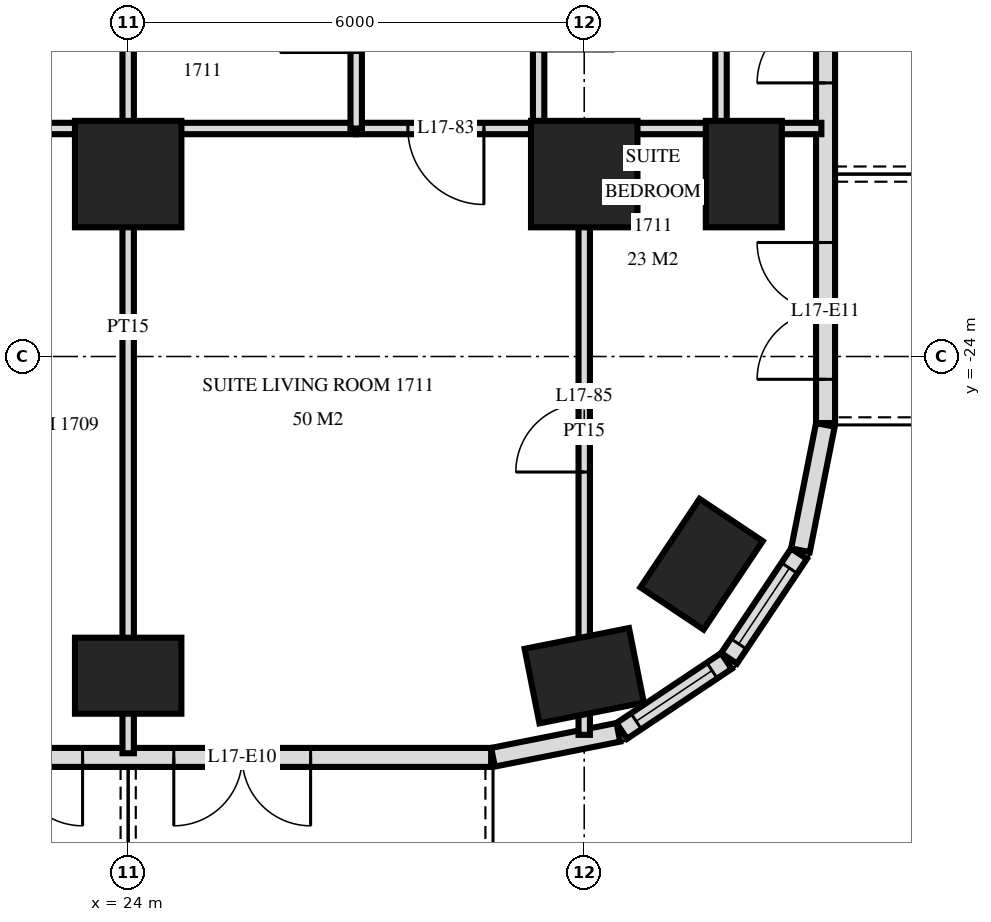
"""IFC4 building model, lengths in metres.
Left out: names, types, materials, properties, quantities, classifications, styles, units other than length and angle.
Written with IfcOpenShell. Run it as: python <this file> out.ifc"""

import sys

from ifc_helpers import new_model, si_unit, direction, frame, frame_2d, origin, origin_2d, place, context, subcontext, project, spatial, rectangle, extrude, element, fill, save


model = new_model("IFC4")
c1 = context("Model", 3, precision=1e-05, world=origin(), true_north=direction((0.0, 1.0)))
c2 = subcontext(c1, "Body", "Model", "MODEL_VIEW")
j1 = project(units=[si_unit("LENGTHUNIT", "METRE"), si_unit("PLANEANGLEUNIT", "RADIAN")], contexts=[c1])
p1 = place(None, origin())
s1 = spatial("IfcSite", under=j1, at=p1, CompositionType="ELEMENT")
p2 = place(p1, origin())
s2 = spatial("IfcBuilding", under=s1, at=p2, CompositionType="ELEMENT")
p3 = place(p2, frame((0.0, 0.0, 70.8)))
s3 = spatial("IfcBuildingStorey", under=s2, at=p3, CompositionType="ELEMENT", Elevation=70.8)
p4 = place(p3, frame((24.0, -28.2, 0.0), z_axis=(0.0, 0.0, 1.0), x_axis=(1.0, 0.0, 0.0)))
e1 = element("IfcColumn", 1, at=p4, inside=s3, PredefinedType="COLUMN", context=c2, shape_type="SweptSolid", body=[
    extrude(rectangle(XDim=1.4, YDim=1.0, at=origin_2d()), origin(), (0.0, 0.0, 1.0), 3.6),
])
p5 = place(p3, frame((24.0, -21.6, 0.0), z_axis=(0.0, 0.0, 1.0), x_axis=(1.0, 0.0, 0.0)))
e2 = element("IfcColumn", 2, at=p5, inside=s3, PredefinedType="COLUMN", context=c2, shape_type="SweptSolid", body=[
    extrude(rectangle(XDim=1.4, YDim=1.4, at=origin_2d()), origin(), (0.0, 0.0, 1.0), 3.6),
])
p6 = place(p3, frame((30.0, -28.2, 0.0), z_axis=(0.0, 0.0, 1.0), x_axis=(0.980792089743, 0.195056086032, 0.0)))
e3 = element("IfcColumn", 3, at=p6, inside=s3, PredefinedType="COLUMN", context=c2, shape_type="SweptSolid", body=[
    extrude(rectangle(XDim=1.4, YDim=1.0, at=origin_2d()), origin(), (0.0, 0.0, 1.0), 3.6),
])
p7 = place(p3, frame((30.0, -21.6, 0.0), z_axis=(0.0, 0.0, 1.0), x_axis=(1.0, 0.0, 0.0)))
e4 = element("IfcColumn", 4, at=p7, inside=s3, PredefinedType="COLUMN", context=c2, shape_type="SweptSolid", body=[
    extrude(rectangle(XDim=1.4, YDim=1.4, at=origin_2d()), origin(), (0.0, 0.0, 1.0), 3.6),
])
for number, where, z_axis, x_axis in (
    (5, (31.544, -26.733, 0.0), (0.0, 0.0, 1.0), (0.556, 0.831, 0.0)),
    (6, (32.1, -21.6, 0.0), (0.0, 0.0, 1.0), (0.0, 1.0, 0.0)),
):
    element("IfcColumn", number, at=place(p3, frame(where, z_axis=z_axis, x_axis=x_axis)), inside=s3, PredefinedType="COLUMN", context=c2, shape_type="SweptSolid", body=[
        extrude(rectangle(XDim=1.4, YDim=1.0, at=origin_2d()), origin(), (0.0, 0.0, 1.0), 3.6),
    ])
p8 = place(p3, frame((-28.775, -29.275, 0.0), z_axis=(0.0, 0.0, 1.0), x_axis=(1.0, 0.0, 0.0)))
e7 = element("IfcWall", 7, at=p8, inside=s3, PredefinedType="SOLIDWALL", context=c2, shape_type="SweptSolid", body=[
    extrude(rectangle(XDim=57.551, YDim=0.25, at=frame_2d((28.775, 0.0))), origin(), (0.0, 0.0, 1.0), 3.32),
])
p9 = place(p8, frame((0.575, 0.0, 0.0)))
e8 = element("IfcOpeningElement", 8, at=p9, cuts=e7, PredefinedType="OPENING", context=c2, shape_type="SweptSolid", body=[
    extrude(rectangle(XDim=1.8, YDim=2.4, at=frame_2d((0.9, 1.2))), frame((0.0, 0.135, 0.0), z_axis=(0.0, -1.0, 0.0), x_axis=(1.0, 0.0, 0.0)), (0.0, 0.0, 1.0), 0.27),
])
p10 = place(p8, frame((5.075, 0.0, 0.3)))
e9 = element("IfcOpeningElement", 9, at=p10, cuts=e7, PredefinedType="OPENING", context=c2, shape_type="SweptSolid", body=[
    extrude(rectangle(XDim=2.4, YDim=2.1, at=frame_2d((1.2, 1.05))), frame((0.0, 0.135, 0.0), z_axis=(0.0, -1.0, 0.0), x_axis=(1.0, 0.0, 0.0)), (0.0, 0.0, 1.0), 0.27),
])
p11 = place(p8, frame((8.375, 0.0, 0.0)))
e10 = element("IfcOpeningElement", 10, at=p11, cuts=e7, PredefinedType="OPENING", context=c2, shape_type="SweptSolid", body=[
    extrude(rectangle(XDim=1.8, YDim=2.4, at=frame_2d((0.9, 1.2))), frame((0.0, 0.135, 0.0), z_axis=(0.0, -1.0, 0.0), x_axis=(1.0, 0.0, 0.0)), (0.0, 0.0, 1.0), 0.27),
])
p12 = place(p8, frame((11.375, 0.0, 0.0)))
e11 = element("IfcOpeningElement", 11, at=p12, cuts=e7, PredefinedType="OPENING", context=c2, shape_type="SweptSolid", body=[
    extrude(rectangle(XDim=1.8, YDim=2.4, at=frame_2d((0.9, 1.2))), frame((0.0, 0.135, 0.0), z_axis=(0.0, -1.0, 0.0), x_axis=(1.0, 0.0, 0.0)), (0.0, 0.0, 1.0), 0.27),
])
p13 = place(p8, frame((14.075, 0.0, 0.3)))
e12 = element("IfcOpeningElement", 12, at=p13, cuts=e7, PredefinedType="OPENING", context=c2, shape_type="SweptSolid", body=[
    extrude(rectangle(XDim=2.4, YDim=2.1, at=frame_2d((1.2, 1.05))), frame((0.0, 0.135, 0.0), z_axis=(0.0, -1.0, 0.0), x_axis=(1.0, 0.0, 0.0)), (0.0, 0.0, 1.0), 0.27),
])
p14 = place(p8, frame((17.375, 0.0, 0.0)))
e13 = element("IfcOpeningElement", 13, at=p14, cuts=e7, PredefinedType="OPENING", context=c2, shape_type="SweptSolid", body=[
    extrude(rectangle(XDim=1.8, YDim=2.4, at=frame_2d((0.9, 1.2))), frame((0.0, 0.135, 0.0), z_axis=(0.0, -1.0, 0.0), x_axis=(1.0, 0.0, 0.0)), (0.0, 0.0, 1.0), 0.27),
])
p15 = place(p8, frame((20.075, 0.0, 0.3)))
e14 = element("IfcOpeningElement", 14, at=p15, cuts=e7, PredefinedType="OPENING", context=c2, shape_type="SweptSolid", body=[
    extrude(rectangle(XDim=2.4, YDim=2.1, at=frame_2d((1.2, 1.05))), frame((0.0, 0.135, 0.0), z_axis=(0.0, -1.0, 0.0), x_axis=(1.0, 0.0, 0.0)), (0.0, 0.0, 1.0), 0.27),
])
p16 = place(p8, frame((23.075, 0.0, 0.3)))
e15 = element("IfcOpeningElement", 15, at=p16, cuts=e7, PredefinedType="OPENING", context=c2, shape_type="SweptSolid", body=[
    extrude(rectangle(XDim=2.4, YDim=2.1, at=frame_2d((1.2, 1.05))), frame((0.0, 0.135, 0.0), z_axis=(0.0, -1.0, 0.0), x_axis=(1.0, 0.0, 0.0)), (0.0, 0.0, 1.0), 0.27),
])
p17 = place(p8, frame((26.375, 0.0, 0.0)))
e16 = element("IfcOpeningElement", 16, at=p17, cuts=e7, PredefinedType="OPENING", context=c2, shape_type="SweptSolid", body=[
    extrude(rectangle(XDim=1.8, YDim=2.4, at=frame_2d((0.9, 1.2))), frame((0.0, 0.135, 0.0), z_axis=(0.0, -1.0, 0.0), x_axis=(1.0, 0.0, 0.0)), (0.0, 0.0, 1.0), 0.27),
])
p18 = place(p8, frame((29.375, 0.0, 0.0)))
e17 = element("IfcOpeningElement", 17, at=p18, cuts=e7, PredefinedType="OPENING", context=c2, shape_type="SweptSolid", body=[
    extrude(rectangle(XDim=1.8, YDim=2.4, at=frame_2d((0.9, 1.2))), frame((0.0, 0.135, 0.0), z_axis=(0.0, -1.0, 0.0), x_axis=(1.0, 0.0, 0.0)), (0.0, 0.0, 1.0), 0.27),
])
p19 = place(p8, frame((32.075, 0.0, 0.3)))
e18 = element("IfcOpeningElement", 18, at=p19, cuts=e7, PredefinedType="OPENING", context=c2, shape_type="SweptSolid", body=[
    extrude(rectangle(XDim=2.4, YDim=2.1, at=frame_2d((1.2, 1.05))), frame((0.0, 0.135, 0.0), z_axis=(0.0, -1.0, 0.0), x_axis=(1.0, 0.0, 0.0)), (0.0, 0.0, 1.0), 0.27),
])
p20 = place(p8, frame((35.375, 0.0, 0.0)))
e19 = element("IfcOpeningElement", 19, at=p20, cuts=e7, PredefinedType="OPENING", context=c2, shape_type="SweptSolid", body=[
    extrude(rectangle(XDim=1.8, YDim=2.4, at=frame_2d((0.9, 1.2))), frame((0.0, 0.135, 0.0), z_axis=(0.0, -1.0, 0.0), x_axis=(1.0, 0.0, 0.0)), (0.0, 0.0, 1.0), 0.27),
])
p21 = place(p8, frame((38.075, 0.0, 0.3)))
e20 = element("IfcOpeningElement", 20, at=p21, cuts=e7, PredefinedType="OPENING", context=c2, shape_type="SweptSolid", body=[
    extrude(rectangle(XDim=2.4, YDim=2.1, at=frame_2d((1.2, 1.05))), frame((0.0, 0.135, 0.0), z_axis=(0.0, -1.0, 0.0), x_axis=(1.0, 0.0, 0.0)), (0.0, 0.0, 1.0), 0.27),
])
p22 = place(p8, frame((41.075, 0.0, 0.3)))
e21 = element("IfcOpeningElement", 21, at=p22, cuts=e7, PredefinedType="OPENING", context=c2, shape_type="SweptSolid", body=[
    extrude(rectangle(XDim=2.4, YDim=2.1, at=frame_2d((1.2, 1.05))), frame((0.0, 0.135, 0.0), z_axis=(0.0, -1.0, 0.0), x_axis=(1.0, 0.0, 0.0)), (0.0, 0.0, 1.0), 0.27),
])
p23 = place(p8, frame((44.375, 0.0, 0.0)))
e22 = element("IfcOpeningElement", 22, at=p23, cuts=e7, PredefinedType="OPENING", context=c2, shape_type="SweptSolid", body=[
    extrude(rectangle(XDim=1.8, YDim=2.4, at=frame_2d((0.9, 1.2))), frame((0.0, 0.135, 0.0), z_axis=(0.0, -1.0, 0.0), x_axis=(1.0, 0.0, 0.0)), (0.0, 0.0, 1.0), 0.27),
])
p24 = place(p8, frame((47.075, 0.0, 0.3)))
e23 = element("IfcOpeningElement", 23, at=p24, cuts=e7, PredefinedType="OPENING", context=c2, shape_type="SweptSolid", body=[
    extrude(rectangle(XDim=2.4, YDim=2.1, at=frame_2d((1.2, 1.05))), frame((0.0, 0.135, 0.0), z_axis=(0.0, -1.0, 0.0), x_axis=(1.0, 0.0, 0.0)), (0.0, 0.0, 1.0), 0.27),
])
p25 = place(p8, frame((50.375, 0.0, 0.0)))
e24 = element("IfcOpeningElement", 24, at=p25, cuts=e7, PredefinedType="OPENING", context=c2, shape_type="SweptSolid", body=[
    extrude(rectangle(XDim=1.8, YDim=2.4, at=frame_2d((0.9, 1.2))), frame((0.0, 0.135, 0.0), z_axis=(0.0, -1.0, 0.0), x_axis=(1.0, 0.0, 0.0)), (0.0, 0.0, 1.0), 0.27),
])
p26 = place(p8, frame((53.375, 0.0, 0.0)))
e25 = element("IfcOpeningElement", 25, at=p26, cuts=e7, PredefinedType="OPENING", context=c2, shape_type="SweptSolid", body=[
    extrude(rectangle(XDim=1.8, YDim=2.4, at=frame_2d((0.9, 1.2))), frame((0.0, 0.135, 0.0), z_axis=(0.0, -1.0, 0.0), x_axis=(1.0, 0.0, 0.0)), (0.0, 0.0, 1.0), 0.27),
])
p27 = place(p3, frame((28.8, -29.273, 0.0), z_axis=(0.0, 0.0, 1.0), x_axis=(0.980775640221, 0.19513878023, 0.0)))
e26 = element("IfcWall", 26, at=p27, inside=s3, PredefinedType="SOLIDWALL", context=c2, shape_type="SweptSolid", body=[
    extrude(rectangle(XDim=1.681, YDim=0.25, at=frame_2d((0.841, 0.0))), origin(), (0.0, 0.0, 1.0), 3.32),
])
p28 = place(p3, frame((30.494, -28.926, 0.0), z_axis=(0.0, 0.0, 1.0), x_axis=(0.831482937015, 0.55555029066, 0.0)))
e27 = element("IfcWall", 27, at=p28, inside=s3, PredefinedType="SOLIDWALL", context=c2, shape_type="SweptSolid", body=[
    extrude(rectangle(XDim=1.656, YDim=0.25, at=frame_2d((0.828, 0.0))), origin(), (0.0, 0.0, 1.0), 3.32),
])
p29 = place(p28, frame((0.228, 0.0, 0.9)))
e28 = element("IfcOpeningElement", 28, at=p29, cuts=e27, PredefinedType="OPENING", context=c2, shape_type="SweptSolid", body=[
    extrude(rectangle(XDim=1.2, YDim=1.5, at=frame_2d((0.6, 0.75))), frame((0.0, 0.135, 0.0), z_axis=(0.0, -1.0, 0.0), x_axis=(1.0, 0.0, 0.0)), (0.0, 0.0, 1.0), 0.27),
])
p30 = place(p3, frame((31.906, -27.971, 0.0), z_axis=(0.0, 0.0, 1.0), x_axis=(0.55555029066, 0.831482937015, 0.0)))
e29 = element("IfcWall", 29, at=p30, inside=s3, PredefinedType="SOLIDWALL", context=c2, shape_type="SweptSolid", body=[
    extrude(rectangle(XDim=1.656, YDim=0.25, at=frame_2d((0.828, 0.0))), origin(), (0.0, 0.0, 1.0), 3.32),
])
p31 = place(p30, frame((0.228, 0.0, 0.9)))
e30 = element("IfcOpeningElement", 30, at=p31, cuts=e29, PredefinedType="OPENING", context=c2, shape_type="SweptSolid", body=[
    extrude(rectangle(XDim=1.2, YDim=1.5, at=frame_2d((0.6, 0.75))), frame((0.0, 0.135, 0.0), z_axis=(0.0, -1.0, 0.0), x_axis=(1.0, 0.0, 0.0)), (0.0, 0.0, 1.0), 0.27),
])
p32 = place(p3, frame((32.844, -26.549, 0.0), z_axis=(0.0, 0.0, 1.0), x_axis=(0.195166572128, 0.980770110232, 0.0)))
e31 = element("IfcWall", 31, at=p32, inside=s3, PredefinedType="SOLIDWALL", context=c2, shape_type="SweptSolid", body=[
    extrude(rectangle(XDim=1.681, YDim=0.25, at=frame_2d((0.841, 0.0))), origin(), (0.0, 0.0, 1.0), 3.32),
])
p33 = place(p3, frame((33.175, -24.875, 0.0), z_axis=(0.0, 0.0, 1.0), x_axis=(0.0, 1.0, 0.0)))
e32 = element("IfcWall", 32, at=p33, inside=s3, PredefinedType="SOLIDWALL", context=c2, shape_type="SweptSolid", body=[
    extrude(rectangle(XDim=21.551, YDim=0.25, at=frame_2d((10.775, 0.0))), origin(), (0.0, 0.0, 1.0), 3.32),
])
p34 = place(p33, frame((0.575, 0.0, 0.0)))
e33 = element("IfcOpeningElement", 33, at=p34, cuts=e32, PredefinedType="OPENING", context=c2, shape_type="SweptSolid", body=[
    extrude(rectangle(XDim=1.8, YDim=2.4, at=frame_2d((0.9, 1.2))), frame((0.0, 0.135, 0.0), z_axis=(0.0, -1.0, 0.0), x_axis=(1.0, 0.0, 0.0)), (0.0, 0.0, 1.0), 0.27),
])
p35 = place(p33, frame((4.475, 0.0, 0.0)))
e34 = element("IfcOpeningElement", 34, at=p35, cuts=e32, PredefinedType="OPENING", context=c2, shape_type="SweptSolid", body=[
    extrude(rectangle(XDim=1.8, YDim=2.4, at=frame_2d((0.9, 1.2))), frame((0.0, 0.135, 0.0), z_axis=(0.0, -1.0, 0.0), x_axis=(1.0, 0.0, 0.0)), (0.0, 0.0, 1.0), 0.27),
])
p36 = place(p33, frame((7.775, 0.0, 0.3)))
e35 = element("IfcOpeningElement", 35, at=p36, cuts=e32, PredefinedType="OPENING", context=c2, shape_type="SweptSolid", body=[
    extrude(rectangle(XDim=1.2, YDim=2.1, at=frame_2d((0.6, 1.05))), frame((0.0, 0.135, 0.0), z_axis=(0.0, -1.0, 0.0), x_axis=(1.0, 0.0, 0.0)), (0.0, 0.0, 1.0), 0.27),
])
p37 = place(p33, frame((13.1, 0.0, 0.0)))
e36 = element("IfcOpeningElement", 36, at=p37, cuts=e32, PredefinedType="OPENING", context=c2, shape_type="SweptSolid", body=[
    extrude(rectangle(XDim=1.8, YDim=2.4, at=frame_2d((0.9, 1.2))), frame((0.0, 0.135, 0.0), z_axis=(0.0, -1.0, 0.0), x_axis=(1.0, 0.0, 0.0)), (0.0, 0.0, 1.0), 0.27),
])
p38 = place(p3, frame((31.8, -21.0, 0.0), z_axis=(0.0, 0.0, 1.0), x_axis=(0.0, 1.0, 0.0)))
e37 = element("IfcWall", 37, at=p38, inside=s3, PredefinedType="PLUMBINGWALL", context=c2, shape_type="SweptSolid", body=[
    extrude(rectangle(XDim=3.0, YDim=0.15, at=frame_2d((1.5, 0.0))), origin(), (0.0, 0.0, 1.0), 3.32),
])
p39 = place(p38, frame((1.12, 0.0, 0.0)))
e38 = element("IfcOpeningElement", 38, at=p39, cuts=e37, PredefinedType="OPENING", context=c2, shape_type="SweptSolid", body=[
    extrude(rectangle(XDim=0.8, YDim=2.1, at=frame_2d((0.4, 1.05))), frame((0.0, 0.085, 0.0), z_axis=(0.0, -1.0, 0.0), x_axis=(1.0, 0.0, 0.0)), (0.0, 0.0, 1.0), 0.17),
])
p40 = place(p3, frame((30.0, -28.978, 0.0), z_axis=(0.0, 0.0, 1.0), x_axis=(0.0, 1.0, 0.0)))
e39 = element("IfcWall", 39, at=p40, inside=s3, PredefinedType="PARTITIONING", context=c2, shape_type="SweptSolid", body=[
    extrude(rectangle(XDim=7.978, YDim=0.15, at=frame_2d((3.989, 0.0))), origin(), (0.0, 0.0, 1.0), 3.32),
])
p41 = place(p40, frame((3.458, 0.0, 0.0)))
e40 = element("IfcOpeningElement", 40, at=p41, cuts=e39, PredefinedType="OPENING", context=c2, shape_type="SweptSolid", body=[
    extrude(rectangle(XDim=0.9, YDim=2.1, at=frame_2d((0.45, 1.05))), frame((0.0, 0.085, 0.0), z_axis=(0.0, -1.0, 0.0), x_axis=(1.0, 0.0, 0.0)), (0.0, 0.0, 1.0), 0.17),
])
p42 = place(p3, frame((29.4, -21.0, 0.0), z_axis=(0.0, 0.0, 1.0), x_axis=(0.0, 1.0, 0.0)))
e41 = element("IfcWall", 41, at=p42, inside=s3, PredefinedType="PARTITIONING", context=c2, shape_type="SweptSolid", body=[
    extrude(rectangle(XDim=3.0, YDim=0.15, at=frame_2d((1.5, 0.0))), origin(), (0.0, 0.0, 1.0), 3.32),
])
p43 = place(p42, frame((1.02, 0.0, 0.0)))
e42 = element("IfcOpeningElement", 42, at=p43, cuts=e41, PredefinedType="OPENING", context=c2, shape_type="SweptSolid", body=[
    extrude(rectangle(XDim=1.0, YDim=2.1, at=frame_2d((0.5, 1.05))), frame((0.0, 0.085, 0.0), z_axis=(0.0, -1.0, 0.0), x_axis=(1.0, 0.0, 0.0)), (0.0, 0.0, 1.0), 0.17),
])
p44 = place(p3, frame((27.0, -21.0, 0.0), z_axis=(0.0, 0.0, 1.0), x_axis=(0.0, 1.0, 0.0)))
e43 = element("IfcWall", 43, at=p44, inside=s3, PredefinedType="PARTITIONING", context=c2, shape_type="SweptSolid", body=[
    extrude(rectangle(XDim=3.0, YDim=0.15, at=frame_2d((1.5, 0.0))), origin(), (0.0, 0.0, 1.0), 3.32),
])
p45 = place(p44, frame((1.0, 0.0, 0.0)))
e44 = element("IfcOpeningElement", 44, at=p45, cuts=e43, PredefinedType="OPENING", context=c2, shape_type="SweptSolid", body=[
    extrude(rectangle(XDim=1.0, YDim=2.1, at=frame_2d((0.5, 1.05))), frame((0.0, 0.085, 0.0), z_axis=(0.0, -1.0, 0.0), x_axis=(1.0, 0.0, 0.0)), (0.0, 0.0, 1.0), 0.17),
])
p46 = place(p3, frame((24.0, -29.22, 0.0), z_axis=(0.0, 0.0, 1.0), x_axis=(0.0, 1.0, 0.0)))
e45 = element("IfcWall", 45, at=p46, inside=s3, PredefinedType="PARTITIONING", context=c2, shape_type="SweptSolid", body=[
    extrude(rectangle(XDim=11.22, YDim=0.15, at=frame_2d((5.61, 0.0))), origin(), (0.0, 0.0, 1.0), 3.32),
])
p47 = place(p3, frame((27.0, -21.0, 0.0), z_axis=(0.0, 0.0, 1.0), x_axis=(1.0, 0.0, 0.0)))
e46 = element("IfcWall", 46, at=p47, inside=s3, PredefinedType="PARTITIONING", context=c2, shape_type="SweptSolid", body=[
    extrude(rectangle(XDim=2.4, YDim=0.15, at=frame_2d((1.2, 0.0))), origin(), (0.0, 0.0, 1.0), 3.32),
])
p48 = place(p47, frame((0.68, 0.0, 0.0)))
e47 = element("IfcOpeningElement", 47, at=p48, cuts=e46, PredefinedType="OPENING", context=c2, shape_type="SweptSolid", body=[
    extrude(rectangle(XDim=1.0, YDim=2.1, at=frame_2d((0.5, 1.05))), frame((0.0, 0.085, 0.0), z_axis=(0.0, -1.0, 0.0), x_axis=(1.0, 0.0, 0.0)), (0.0, 0.0, 1.0), 0.17),
])
p49 = place(p3, frame((22.3, -21.0, 0.0), z_axis=(0.0, 0.0, 1.0), x_axis=(1.0, 0.0, 0.0)))
e48 = element("IfcWall", 48, at=p49, inside=s3, PredefinedType="PARTITIONING", context=c2, shape_type="SweptSolid", body=[
    extrude(rectangle(XDim=4.7, YDim=0.15, at=frame_2d((2.35, 0.0))), origin(), (0.0, 0.0, 1.0), 3.32),
])
p50 = place(p3, frame((29.4, -21.0, 0.0), z_axis=(0.0, 0.0, 1.0), x_axis=(1.0, 0.0, 0.0)))
e49 = element("IfcWall", 49, at=p50, inside=s3, PredefinedType="PARTITIONING", context=c2, shape_type="SweptSolid", body=[
    extrude(rectangle(XDim=2.4, YDim=0.15, at=frame_2d((1.2, 0.0))), origin(), (0.0, 0.0, 1.0), 3.32),
])
p51 = place(p3, frame((31.8, -21.0, 0.0), z_axis=(0.0, 0.0, 1.0), x_axis=(1.0, 0.0, 0.0)))
e50 = element("IfcWall", 50, at=p51, inside=s3, PredefinedType="PLUMBINGWALL", context=c2, shape_type="SweptSolid", body=[
    extrude(rectangle(XDim=1.32, YDim=0.15, at=frame_2d((0.66, 0.0))), origin(), (0.0, 0.0, 1.0), 3.32),
])
p52 = place(p29, origin())
e51 = element("IfcWindow", 51, at=p52, inside=s3, PartitioningType="SINGLE_PANEL", PredefinedType="WINDOW", context=c2, shape_type="SweptSolid", body=[
    extrude(rectangle(XDim=1.2, YDim=1.5, at=frame_2d((0.6, 0.75))), frame((0.0, 0.03, 0.0), z_axis=(0.0, -1.0, 0.0), x_axis=(1.0, 0.0, 0.0)), (0.0, 0.0, 1.0), 0.06),
])
fill(e28, e51)
p53 = place(p31, origin())
e52 = element("IfcWindow", 52, at=p53, inside=s3, PartitioningType="SINGLE_PANEL", PredefinedType="WINDOW", context=c2, shape_type="SweptSolid", body=[
    extrude(rectangle(XDim=1.2, YDim=1.5, at=frame_2d((0.6, 0.75))), frame((0.0, 0.03, 0.0), z_axis=(0.0, -1.0, 0.0), x_axis=(1.0, 0.0, 0.0)), (0.0, 0.0, 1.0), 0.06),
])
fill(e30, e52)
p54 = place(p25, frame((0.9, 0.0, 0.0), z_axis=(0.0, 0.0, 1.0), x_axis=(-1.0, 0.0, 0.0)))
e53 = element("IfcDoor", 53, at=p54, inside=s3, OperationType="DOUBLE_DOOR_SINGLE_SWING", PredefinedType="DOOR", context=c2, shape_type="SweptSolid", body=[
    extrude(rectangle(XDim=1.8, YDim=2.4, at=frame_2d((0.0, 1.2))), frame((0.0, -0.025, 0.0), z_axis=(0.0, 1.0, 0.0), x_axis=(-1.0, 0.0, 0.0)), (0.0, 0.0, 1.0), 0.05),
])
fill(e24, e53)
p55 = place(p26, frame((0.9, 0.0, 0.0), z_axis=(0.0, 0.0, 1.0), x_axis=(-1.0, 0.0, 0.0)))
e54 = element("IfcDoor", 54, at=p55, inside=s3, OperationType="DOUBLE_DOOR_SINGLE_SWING", PredefinedType="DOOR", context=c2, shape_type="SweptSolid", body=[
    extrude(rectangle(XDim=1.8, YDim=2.4, at=frame_2d((0.0, 1.2))), frame((0.0, -0.025, 0.0), z_axis=(0.0, 1.0, 0.0), x_axis=(-1.0, 0.0, 0.0)), (0.0, 0.0, 1.0), 0.05),
])
fill(e25, e54)
p56 = place(p34, origin())
e55 = element("IfcDoor", 55, at=p56, inside=s3, OperationType="DOUBLE_DOOR_SINGLE_SWING", PredefinedType="DOOR", context=c2, shape_type="SweptSolid", body=[
    extrude(rectangle(XDim=1.8, YDim=2.4, at=frame_2d((0.9, 1.2))), frame((0.0, 0.025, 0.0), z_axis=(0.0, -1.0, 0.0), x_axis=(1.0, 0.0, 0.0)), (0.0, 0.0, 1.0), 0.05),
])
fill(e33, e55)
p57 = place(p35, origin())
e56 = element("IfcDoor", 56, at=p57, inside=s3, OperationType="DOUBLE_DOOR_SINGLE_SWING", PredefinedType="DOOR", context=c2, shape_type="SweptSolid", body=[
    extrude(rectangle(XDim=1.8, YDim=2.4, at=frame_2d((0.9, 1.2))), frame((0.0, 0.025, 0.0), z_axis=(0.0, -1.0, 0.0), x_axis=(1.0, 0.0, 0.0)), (0.0, 0.0, 1.0), 0.05),
])
fill(e34, e56)
p58 = place(p48, frame((0.5, 0.0, 0.0), z_axis=(0.0, 0.0, 1.0), x_axis=(-1.0, 0.0, 0.0)))
e57 = element("IfcDoor", 57, at=p58, inside=s3, OperationType="SINGLE_SWING_RIGHT", PredefinedType="DOOR", context=c2, shape_type="SweptSolid", body=[
    extrude(rectangle(XDim=1.0, YDim=2.1, at=frame_2d((0.0, 1.05))), frame((0.0, -0.025, 0.0), z_axis=(0.0, 1.0, 0.0), x_axis=(-1.0, 0.0, 0.0)), (0.0, 0.0, 1.0), 0.05),
])
fill(e47, e57)
p59 = place(p41, origin())
e58 = element("IfcDoor", 58, at=p59, inside=s3, OperationType="SINGLE_SWING_RIGHT", PredefinedType="DOOR", context=c2, shape_type="SweptSolid", body=[
    extrude(rectangle(XDim=0.9, YDim=2.1, at=frame_2d((0.45, 1.05))), frame((0.0, 0.025, 0.0), z_axis=(0.0, -1.0, 0.0), x_axis=(1.0, 0.0, 0.0)), (0.0, 0.0, 1.0), 0.05),
])
fill(e40, e58)
save(model, sys.argv[1])
